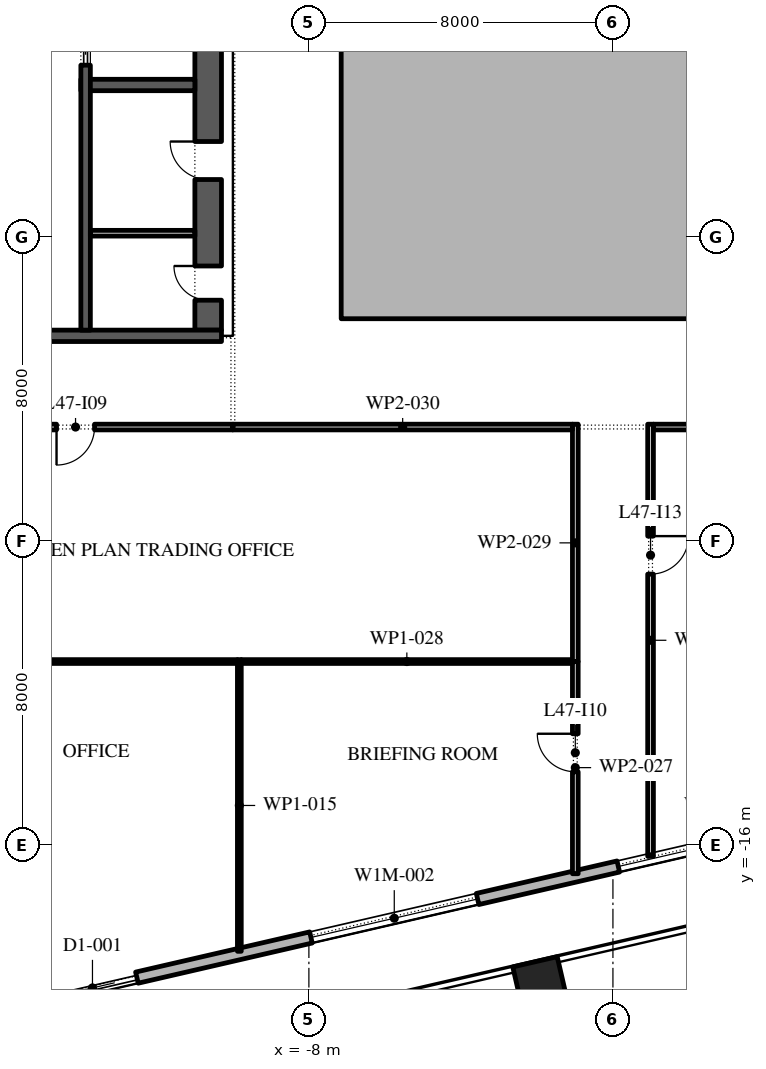
"""IFC4 building model, lengths in metres.
Left out: names, types, materials, properties, quantities, classifications, styles, units other than length and angle.
Written with IfcOpenShell. Run it as: python <this file> out.ifc"""

import sys

from ifc_helpers import new_model, si_unit, direction, frame, frame_2d, origin, origin_2d, place, context, subcontext, project, spatial, polyline, rectangle, outline, extrude, element, fill, save


model = new_model("IFC4")
c1 = context("Model", 3, precision=1e-05, world=origin(), true_north=direction((0.0, 1.0)))
c2 = subcontext(c1, "Body", "Model", "MODEL_VIEW")
j1 = project(units=[si_unit("LENGTHUNIT", "METRE"), si_unit("PLANEANGLEUNIT", "RADIAN")], contexts=[c1])
p1 = place(None, origin())
s1 = spatial("IfcSite", under=j1, at=p1, CompositionType="ELEMENT")
p2 = place(p1, origin())
s2 = spatial("IfcBuilding", under=s1, at=p2, CompositionType="ELEMENT")
p3 = place(p2, frame((0.0, 0.0, 213.6)))
s3 = spatial("IfcBuildingStorey", under=s2, at=p3, CompositionType="ELEMENT", Elevation=213.6)
p4 = place(p3, frame((-1.916, -19.655, 0.0), z_axis=(0.0, 0.0, 1.0), x_axis=(0.974370064785, 0.224951054344, 0.0)))
e1 = element("IfcColumn", 1, at=p4, inside=s3, PredefinedType="COLUMN", context=c2, shape_type="SweptSolid", body=[
    extrude(rectangle(XDim=1.2, YDim=1.2, at=origin_2d()), origin(), (0.0, 0.0, 1.0), 4.2),
])
p5 = place(p3, origin())
e2 = element("IfcWall", 2, at=p5, inside=s3, PredefinedType="STANDARD", context=c2, shape_type="SweptSolid", body=[
    extrude(outline(polyline([(-7.15, -2.15), (7.15, -2.15), (7.15, 16.15), (-7.15, 16.15), (-7.15, -2.15)]), holes=[polyline([(-7.0, -2.0), (-7.0, 16.0), (7.0, 16.0), (7.0, -2.0), (-7.0, -2.0)])]), origin(), (0.0, 0.0, 1.0), 4.0),
])
p6 = place(p3, frame((-17.592, -20.657, 0.0), z_axis=(0.0, 0.0, 1.0), x_axis=(0.974370243697, 0.224950279389, 0.0)))
e3 = element("IfcWall", 3, at=p6, inside=s3, PredefinedType="STANDARD", context=c2, shape_type="SweptSolid", body=[
    extrude(rectangle(XDim=49.5, YDim=0.3, at=frame_2d((24.75, 0.0))), origin(), (0.0, 0.0, 1.0), 4.0),
])
p7 = place(p6, frame((2.8, 0.0, 0.0)))
e4 = element("IfcOpeningElement", 4, at=p7, cuts=e3, PredefinedType="OPENING", context=c2, shape_type="SweptSolid", body=[
    extrude(rectangle(XDim=2.4, YDim=3.5, at=frame_2d((1.2, 1.75))), frame((0.0, 0.16, 0.0), z_axis=(0.0, -1.0, 0.0), x_axis=(1.0, 0.0, 0.0)), (0.0, 0.0, 1.0), 0.32),
])
p8 = place(p6, frame((9.9, 0.0, 0.45)))
e5 = element("IfcOpeningElement", 5, at=p8, cuts=e3, PredefinedType="OPENING", context=c2, shape_type="SweptSolid", body=[
    extrude(rectangle(XDim=4.5, YDim=2.575, at=frame_2d((2.25, 1.288))), frame((0.0, 0.16, 0.0), z_axis=(0.0, -1.0, 0.0), x_axis=(1.0, 0.0, 0.0)), (0.0, 0.0, 1.0), 0.32),
])
p9 = place(p6, frame((18.2, 0.0, 0.45)))
e6 = element("IfcOpeningElement", 6, at=p9, cuts=e3, PredefinedType="OPENING", context=c2, shape_type="SweptSolid", body=[
    extrude(rectangle(XDim=4.5, YDim=2.675, at=frame_2d((2.25, 1.337))), frame((0.0, 0.16, 0.0), z_axis=(0.0, -1.0, 0.0), x_axis=(1.0, 0.0, 0.0)), (0.0, 0.0, 1.0), 0.32),
])
p10 = place(p6, frame((26.5, 0.0, 0.45)))
e7 = element("IfcOpeningElement", 7, at=p10, cuts=e3, PredefinedType="OPENING", context=c2, shape_type="SweptSolid", body=[
    extrude(rectangle(XDim=4.5, YDim=2.75, at=frame_2d((2.25, 1.375))), frame((0.0, 0.16, 0.0), z_axis=(0.0, -1.0, 0.0), x_axis=(1.0, 0.0, 0.0)), (0.0, 0.0, 1.0), 0.32),
])
p11 = place(p6, frame((36.8, 0.0, 0.0)))
e8 = element("IfcOpeningElement", 8, at=p11, cuts=e3, PredefinedType="OPENING", context=c2, shape_type="SweptSolid", body=[
    extrude(rectangle(XDim=2.4, YDim=3.275, at=frame_2d((1.2, 1.637))), frame((0.0, 0.16, 0.0), z_axis=(0.0, -1.0, 0.0), x_axis=(1.0, 0.0, 0.0)), (0.0, 0.0, 1.0), 0.32),
])
p12 = place(p6, frame((43.1, 0.0, 0.45)))
e9 = element("IfcOpeningElement", 9, at=p12, cuts=e3, PredefinedType="OPENING", context=c2, shape_type="SweptSolid", body=[
    extrude(rectangle(XDim=4.5, YDim=2.875, at=frame_2d((2.25, 1.438))), frame((0.0, 0.16, 0.0), z_axis=(0.0, -1.0, 0.0), x_axis=(1.0, 0.0, 0.0)), (0.0, 0.0, 1.0), 0.32),
])
p13 = place(p3, frame((-10.65, -2.45, 0.0), z_axis=(0.0, 0.0, 1.0), x_axis=(0.0, 1.0, 0.0)))
e10 = element("IfcWall", 10, at=p13, inside=s3, PredefinedType="SHEAR", context=c2, shape_type="SweptSolid", body=[
    extrude(rectangle(XDim=27.9, YDim=0.7, at=frame_2d((13.95, 0.0))), origin(), (0.0, 0.0, 1.0), 4.0),
])
p14 = place(p13, frame((23.65, 0.0, 0.0)))
e11 = element("IfcOpeningElement", 11, at=p14, cuts=e10, PredefinedType="OPENING", context=c2, shape_type="SweptSolid", body=[
    extrude(rectangle(XDim=2.4, YDim=2.1, at=frame_2d((1.2, 1.05))), frame((0.0, 0.36, 0.0), z_axis=(0.0, -1.0, 0.0), x_axis=(1.0, 0.0, 0.0)), (0.0, 0.0, 1.0), 0.72),
])
p15 = place(p13, frame((0.788, 0.0, 0.0)))
e12 = element("IfcOpeningElement", 12, at=p15, cuts=e10, PredefinedType="OPENING", context=c2, shape_type="SweptSolid", body=[
    extrude(rectangle(XDim=0.9, YDim=2.1, at=frame_2d((0.45, 1.05))), frame((0.0, 0.36, 0.0), z_axis=(0.0, -1.0, 0.0), x_axis=(1.0, 0.0, 0.0)), (0.0, 0.0, 1.0), 0.72),
])
p16 = place(p13, frame((3.962, 0.0, 0.0)))
e13 = element("IfcOpeningElement", 13, at=p16, cuts=e10, PredefinedType="OPENING", context=c2, shape_type="SweptSolid", body=[
    extrude(rectangle(XDim=1.0, YDim=2.1, at=frame_2d((0.5, 1.05))), frame((0.0, 0.36, 0.0), z_axis=(0.0, -1.0, 0.0), x_axis=(1.0, 0.0, 0.0)), (0.0, 0.0, 1.0), 0.72),
])
p17 = place(p3, frame((-21.7, -2.6, 0.0), z_axis=(0.0, 0.0, 1.0), x_axis=(1.0, 0.0, 0.0)))
e14 = element("IfcWall", 14, at=p17, inside=s3, PredefinedType="SHEAR", context=c2, shape_type="SweptSolid", body=[
    extrude(rectangle(XDim=11.4, YDim=0.3, at=frame_2d((5.7, 0.0))), origin(), (0.0, 0.0, 1.0), 4.0),
])
p18 = place(p3, frame((-14.0, 4.0, 0.0), z_axis=(0.0, 0.0, 1.0), x_axis=(1.0, 0.0, 0.0)))
e15 = element("IfcWall", 15, at=p18, inside=s3, PredefinedType="SHEAR", context=c2, shape_type="SweptSolid", body=[
    extrude(rectangle(XDim=3.0, YDim=0.3, at=frame_2d((1.5, 0.0))), origin(), (0.0, 0.0, 1.0), 4.0),
])
p19 = place(p3, frame((-13.875, -2.45, 0.0), z_axis=(0.0, 0.0, 1.0), x_axis=(0.0, 1.0, 0.0)))
e16 = element("IfcWall", 16, at=p19, inside=s3, PredefinedType="SHEAR", context=c2, shape_type="SweptSolid", body=[
    extrude(rectangle(XDim=21.3, YDim=0.25, at=frame_2d((10.65, 0.0))), origin(), (0.0, 0.0, 1.0), 4.0),
])
p20 = place(p19, frame((17.786, 0.0, 0.0)))
e17 = element("IfcOpeningElement", 17, at=p20, cuts=e16, PredefinedType="OPENING", context=c2, shape_type="SweptSolid", body=[
    extrude(rectangle(XDim=0.9, YDim=2.1, at=frame_2d((0.45, 1.05))), frame((0.0, 0.135, 0.0), z_axis=(0.0, -1.0, 0.0), x_axis=(1.0, 0.0, 0.0)), (0.0, 0.0, 1.0), 0.27),
])
p21 = place(p19, frame((6.971, 0.0, 0.0)))
e18 = element("IfcOpeningElement", 18, at=p21, cuts=e16, PredefinedType="OPENING", context=c2, shape_type="SweptSolid", body=[
    extrude(rectangle(XDim=1.1, YDim=2.1, at=frame_2d((0.55, 1.05))), frame((0.0, 0.135, 0.0), z_axis=(0.0, -1.0, 0.0), x_axis=(1.0, 0.0, 0.0)), (0.0, 0.0, 1.0), 0.27),
])
p22 = place(p19, frame((9.114, 0.0, 0.0)))
e19 = element("IfcOpeningElement", 19, at=p22, cuts=e16, PredefinedType="OPENING", context=c2, shape_type="SweptSolid", body=[
    extrude(rectangle(XDim=1.1, YDim=2.1, at=frame_2d((0.55, 1.05))), frame((0.0, 0.135, 0.0), z_axis=(0.0, -1.0, 0.0), x_axis=(1.0, 0.0, 0.0)), (0.0, 0.0, 1.0), 0.27),
])
p23 = place(p19, frame((11.257, 0.0, 0.0)))
e20 = element("IfcOpeningElement", 20, at=p23, cuts=e16, PredefinedType="OPENING", context=c2, shape_type="SweptSolid", body=[
    extrude(rectangle(XDim=1.1, YDim=2.1, at=frame_2d((0.55, 1.05))), frame((0.0, 0.135, 0.0), z_axis=(0.0, -1.0, 0.0), x_axis=(1.0, 0.0, 0.0)), (0.0, 0.0, 1.0), 0.27),
])
p24 = place(p19, frame((13.4, 0.0, 0.0)))
e21 = element("IfcOpeningElement", 21, at=p24, cuts=e16, PredefinedType="OPENING", context=c2, shape_type="SweptSolid", body=[
    extrude(rectangle(XDim=1.1, YDim=2.1, at=frame_2d((0.55, 1.05))), frame((0.0, 0.135, 0.0), z_axis=(0.0, -1.0, 0.0), x_axis=(1.0, 0.0, 0.0)), (0.0, 0.0, 1.0), 0.27),
])
p25 = place(p3, frame((-13.75, 0.1, 0.0), z_axis=(0.0, 0.0, 1.0), x_axis=(1.0, 0.0, 0.0)))
e22 = element("IfcWall", 22, at=p25, inside=s3, PredefinedType="PARTITIONING", context=c2, shape_type="SweptSolid", body=[
    extrude(rectangle(XDim=2.75, YDim=0.15, at=frame_2d((1.375, 0.0))), origin(), (0.0, 0.0, 1.0), 4.0),
])
p26 = place(p3, frame((-10.0, -5.0, 0.0), z_axis=(0.0, 0.0, 1.0), x_axis=(-1.0, 0.0, 0.0)))
e23 = element("IfcWall", 23, at=p26, inside=s3, PredefinedType="PARTITIONING", context=c2, shape_type="SweptSolid", body=[
    extrude(rectangle(XDim=13.715, YDim=0.15, at=frame_2d((6.857, 0.0))), origin(), (0.0, 0.0, 1.0), 4.0),
])
p27 = place(p26, frame((3.64, 0.0, 0.0)))
e24 = element("IfcOpeningElement", 24, at=p27, cuts=e23, PredefinedType="OPENING", context=c2, shape_type="SweptSolid", body=[
    extrude(rectangle(XDim=1.0, YDim=2.1, at=frame_2d((0.5, 1.05))), frame((0.0, 0.085, 0.0), z_axis=(0.0, -1.0, 0.0), x_axis=(1.0, 0.0, 0.0)), (0.0, 0.0, 1.0), 0.17),
])
p28 = place(p3, frame((-9.83, -18.794, 0.0), z_axis=(0.0, 0.0, 1.0), x_axis=(0.0, 1.0, 0.0)))
e25 = element("IfcWall", 25, at=p28, inside=s3, PredefinedType="PARTITIONING", context=c2, shape_type="SweptSolid", body=[
    extrude(rectangle(XDim=7.674, YDim=0.1, at=frame_2d((3.837, 0.0))), origin(), (0.0, 0.0, 1.0), 4.0),
])
p29 = place(p3, frame((-9.88, -11.17, 0.0), z_axis=(0.0, 0.0, 1.0), x_axis=(-1.0, 0.0, 0.0)))
e26 = element("IfcWall", 26, at=p29, inside=s3, PredefinedType="PARTITIONING", context=c2, shape_type="SweptSolid", body=[
    extrude(rectangle(XDim=13.68, YDim=0.1, at=frame_2d((6.84, 0.0))), origin(), (0.0, 0.0, 1.0), 4.0),
])
p30 = place(p29, frame((6.55, 0.0, 0.0)))
e27 = element("IfcOpeningElement", 27, at=p30, cuts=e26, PredefinedType="OPENING", context=c2, shape_type="SweptSolid", body=[
    extrude(rectangle(XDim=0.9, YDim=2.1, at=frame_2d((0.45, 1.05))), frame((0.0, 0.06, 0.0), z_axis=(0.0, -1.0, 0.0), x_axis=(1.0, 0.0, 0.0)), (0.0, 0.0, 1.0), 0.12),
])
p31 = place(p3, frame((-0.99, -16.753, 0.0), z_axis=(0.0, 0.0, 1.0), x_axis=(0.0, 1.0, 0.0)))
e28 = element("IfcWall", 28, at=p31, inside=s3, PredefinedType="PARTITIONING", context=c2, shape_type="SweptSolid", body=[
    extrude(rectangle(XDim=5.583, YDim=0.15, at=frame_2d((2.792, 0.0))), origin(), (0.0, 0.0, 1.0), 4.0),
])
p32 = place(p31, frame((2.683, 0.0, 0.0)))
e29 = element("IfcOpeningElement", 29, at=p32, cuts=e28, PredefinedType="OPENING", context=c2, shape_type="SweptSolid", body=[
    extrude(rectangle(XDim=1.0, YDim=2.1, at=frame_2d((0.5, 1.05))), frame((0.0, 0.085, 0.0), z_axis=(0.0, -1.0, 0.0), x_axis=(1.0, 0.0, 0.0)), (0.0, 0.0, 1.0), 0.17),
])
p33 = place(p3, frame((-1.065, -11.17, 0.0), z_axis=(0.0, 0.0, 1.0), x_axis=(-1.0, 0.0, 0.0)))
e30 = element("IfcWall", 30, at=p33, inside=s3, PredefinedType="PARTITIONING", context=c2, shape_type="SweptSolid", body=[
    extrude(rectangle(XDim=8.715, YDim=0.1, at=frame_2d((4.357, 0.0))), origin(), (0.0, 0.0, 1.0), 4.0),
])
p34 = place(p3, frame((-0.99, -11.17, 0.0), z_axis=(0.0, 0.0, 1.0), x_axis=(0.0, 1.0, 0.0)))
e31 = element("IfcWall", 31, at=p34, inside=s3, PredefinedType="PARTITIONING", context=c2, shape_type="SweptSolid", body=[
    extrude(rectangle(XDim=6.245, YDim=0.15, at=frame_2d((3.123, 0.0))), origin(), (0.0, 0.0, 1.0), 4.0),
])
p35 = place(p3, frame((-1.065, -5.0, 0.0), z_axis=(0.0, 0.0, 1.0), x_axis=(-1.0, 0.0, 0.0)))
e32 = element("IfcWall", 32, at=p35, inside=s3, PredefinedType="PARTITIONING", context=c2, shape_type="SweptSolid", body=[
    extrude(rectangle(XDim=8.935, YDim=0.15, at=frame_2d((4.468, 0.0))), origin(), (0.0, 0.0, 1.0), 4.0),
])
p36 = place(p3, frame((0.99, -4.925, 0.0), z_axis=(0.0, 0.0, 1.0), x_axis=(0.0, -1.0, 0.0)))
e33 = element("IfcWall", 33, at=p36, inside=s3, PredefinedType="PARTITIONING", context=c2, shape_type="SweptSolid", body=[
    extrude(rectangle(XDim=11.371, YDim=0.15, at=frame_2d((5.686, 0.0))), origin(), (0.0, 0.0, 1.0), 4.0),
])
p37 = place(p36, frame((2.945, 0.0, 0.0)))
e34 = element("IfcOpeningElement", 34, at=p37, cuts=e33, PredefinedType="OPENING", context=c2, shape_type="SweptSolid", body=[
    extrude(rectangle(XDim=1.0, YDim=2.1, at=frame_2d((0.5, 1.05))), frame((0.0, 0.085, 0.0), z_axis=(0.0, -1.0, 0.0), x_axis=(1.0, 0.0, 0.0)), (0.0, 0.0, 1.0), 0.17),
])
p38 = place(p3, frame((10.0, -5.0, 0.0), z_axis=(0.0, 0.0, 1.0), x_axis=(-1.0, 0.0, 0.0)))
e35 = element("IfcWall", 35, at=p38, inside=s3, PredefinedType="PARTITIONING", context=c2, shape_type="SweptSolid", body=[
    extrude(rectangle(XDim=8.935, YDim=0.15, at=frame_2d((4.468, 0.0))), origin(), (0.0, 0.0, 1.0), 4.0),
])
p39 = place(p7, origin())
e36 = element("IfcDoor", 36, at=p39, inside=s3, OperationType="DOUBLE_DOOR_SLIDING", PredefinedType="DOOR", context=c2, shape_type="SweptSolid", body=[
    extrude(rectangle(XDim=2.4, YDim=3.5, at=frame_2d((1.2, 1.75))), frame((0.0, 0.025, 0.0), z_axis=(0.0, -1.0, 0.0), x_axis=(1.0, 0.0, 0.0)), (0.0, 0.0, 1.0), 0.05),
])
fill(e4, e36)
p40 = place(p8, origin())
e37 = element("IfcWindow", 37, at=p40, inside=s3, PartitioningType="DOUBLE_PANEL_VERTICAL", PredefinedType="WINDOW", context=c2, shape_type="SweptSolid", body=[
    extrude(rectangle(XDim=4.5, YDim=2.575, at=frame_2d((2.25, 1.288))), frame((0.0, 0.03, 0.0), z_axis=(0.0, -1.0, 0.0), x_axis=(1.0, 0.0, 0.0)), (0.0, 0.0, 1.0), 0.06),
])
fill(e5, e37)
p41 = place(p9, origin())
e38 = element("IfcWindow", 38, at=p41, inside=s3, PartitioningType="DOUBLE_PANEL_VERTICAL", PredefinedType="WINDOW", context=c2, shape_type="SweptSolid", body=[
    extrude(rectangle(XDim=4.5, YDim=2.675, at=frame_2d((2.25, 1.337))), frame((0.0, 0.03, 0.0), z_axis=(0.0, -1.0, 0.0), x_axis=(1.0, 0.0, 0.0)), (0.0, 0.0, 1.0), 0.06),
])
fill(e6, e38)
p42 = place(p21, origin())
e39 = element("IfcDoor", 39, at=p42, inside=s3, OperationType="SLIDING_TO_LEFT", PredefinedType="DOOR", context=c2, shape_type="SweptSolid", body=[
    extrude(rectangle(XDim=1.1, YDim=2.1, at=frame_2d((0.55, 1.05))), frame((0.0, 0.025, 0.0), z_axis=(0.0, -1.0, 0.0), x_axis=(1.0, 0.0, 0.0)), (0.0, 0.0, 1.0), 0.05),
])
fill(e18, e39)
p43 = place(p15, origin())
e40 = element("IfcDoor", 40, at=p43, inside=s3, OperationType="SINGLE_SWING_LEFT", PredefinedType="DOOR", context=c2, shape_type="SweptSolid", body=[
    extrude(rectangle(XDim=0.9, YDim=2.1, at=frame_2d((0.45, 1.05))), frame((0.0, 0.35, 0.0), z_axis=(0.0, -1.0, 0.0), x_axis=(1.0, 0.0, 0.0)), (0.0, 0.0, 1.0), 0.05),
])
fill(e12, e40)
p44 = place(p16, origin())
e41 = element("IfcDoor", 41, at=p44, inside=s3, OperationType="SINGLE_SWING_LEFT", PredefinedType="DOOR", context=c2, shape_type="SweptSolid", body=[
    extrude(rectangle(XDim=1.0, YDim=2.1, at=frame_2d((0.5, 1.05))), frame((0.0, 0.35, 0.0), z_axis=(0.0, -1.0, 0.0), x_axis=(1.0, 0.0, 0.0)), (0.0, 0.0, 1.0), 0.05),
])
fill(e13, e41)
p45 = place(p27, origin())
e42 = element("IfcDoor", 42, at=p45, inside=s3, OperationType="SINGLE_SWING_LEFT", PredefinedType="DOOR", context=c2, shape_type="SweptSolid", body=[
    extrude(rectangle(XDim=1.0, YDim=2.1, at=frame_2d((0.5, 1.05))), frame((0.0, 0.025, 0.0), z_axis=(0.0, -1.0, 0.0), x_axis=(1.0, 0.0, 0.0)), (0.0, 0.0, 1.0), 0.05),
])
fill(e24, e42)
p46 = place(p32, origin())
e43 = element("IfcDoor", 43, at=p46, inside=s3, OperationType="SINGLE_SWING_LEFT", PredefinedType="DOOR", context=c2, shape_type="SweptSolid", body=[
    extrude(rectangle(XDim=1.0, YDim=2.1, at=frame_2d((0.5, 1.05))), frame((0.0, 0.025, 0.0), z_axis=(0.0, -1.0, 0.0), x_axis=(1.0, 0.0, 0.0)), (0.0, 0.0, 1.0), 0.05),
])
fill(e29, e43)
p47 = place(p37, origin())
e44 = element("IfcDoor", 44, at=p47, inside=s3, OperationType="SINGLE_SWING_RIGHT", PredefinedType="DOOR", context=c2, shape_type="SweptSolid", body=[
    extrude(rectangle(XDim=1.0, YDim=2.1, at=frame_2d((0.5, 1.05))), frame((0.0, 0.025, 0.0), z_axis=(0.0, -1.0, 0.0), x_axis=(1.0, 0.0, 0.0)), (0.0, 0.0, 1.0), 0.05),
])
fill(e34, e44)
save(model, sys.argv[1])
